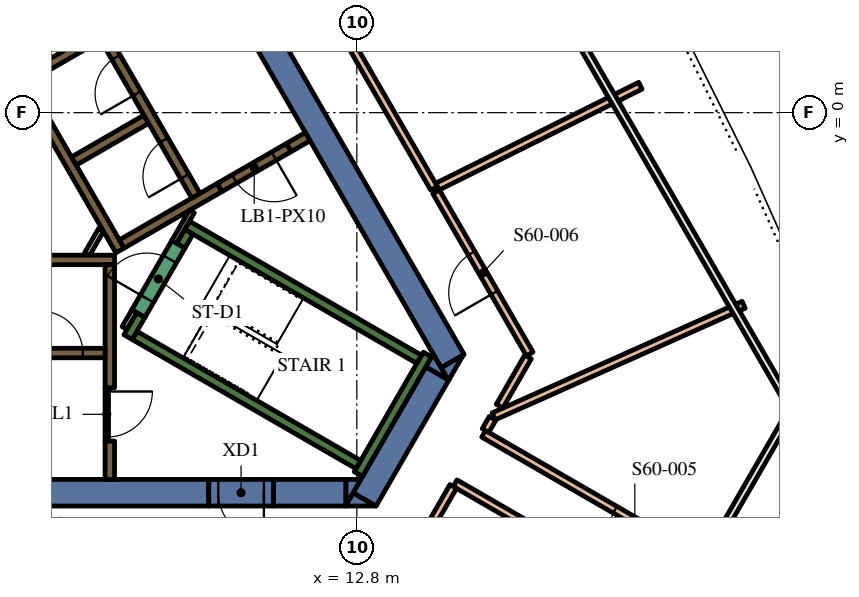
"""IFC4 building model, lengths in metres.
Left out: names, types, materials, properties, quantities, classifications, styles, units other than length and angle.
Written with IfcOpenShell. Run it as: python <this file> out.ifc"""

import sys

from ifc_helpers import new_model, si_unit, direction, frame, frame_2d, origin, place, context, subcontext, project, spatial, polyline, rectangle, outline, extrude, element, fill, save


model = new_model("IFC4")
c1 = context("Model", 3, precision=1e-05, world=origin(), true_north=direction((0.0, 1.0)))
c2 = subcontext(c1, "Body", "Model", "MODEL_VIEW")
j1 = project(units=[si_unit("LENGTHUNIT", "METRE"), si_unit("PLANEANGLEUNIT", "RADIAN")], contexts=[c1])
p1 = place(None, origin())
s1 = spatial("IfcSite", under=j1, at=p1, CompositionType="ELEMENT")
p2 = place(p1, origin())
s2 = spatial("IfcBuilding", under=s1, at=p2, CompositionType="ELEMENT")
p3 = place(p2, frame((0.0, 0.0, 256.2)))
s3 = spatial("IfcBuildingStorey", under=s2, at=p3, CompositionType="ELEMENT", Elevation=256.2)
p4 = place(p3, frame((9.085, 4.264, 0.0), z_axis=(0.0, 0.0, 1.0), x_axis=(0.499998082512, -0.866026510844, 0.0)))
e1 = element("IfcWall", 1, at=p4, inside=s3, PredefinedType="SOLIDWALL", context=c2, shape_type="SweptSolid", body=[
    extrude(rectangle(XDim=12.472, YDim=0.7, at=frame_2d((6.236, 0.0))), origin(), (0.0, 0.0, 1.0), 5.4),
])
p5 = place(p3, origin())
e2 = element("IfcWall", 2, at=p5, inside=s3, PredefinedType="SOLIDWALL", context=c2, shape_type="SweptSolid", body=[
    extrude(outline(polyline([(15.213, -7.05), (15.019, -6.714), (15.601, -6.378), (15.213, -7.05)])), origin(), (0.0, 0.0, 1.0), 5.4),
])
p6 = place(p3, frame((13.003, -10.179, 0.0), z_axis=(0.0, 0.0, 1.0), x_axis=(0.499972675833, 0.866041178825, 0.0)))
e3 = element("IfcWall", 3, at=p6, inside=s3, PredefinedType="SOLIDWALL", context=c2, shape_type="SweptSolid", body=[
    extrude(rectangle(XDim=3.829, YDim=0.7, at=frame_2d((1.915, 0.0))), origin(), (0.0, 0.0, 1.0), 5.4),
])
e4 = element("IfcWall", 4, at=p5, inside=s3, PredefinedType="SOLIDWALL", context=c2, shape_type="SweptSolid", body=[
    extrude(outline(polyline([(12.698, -10.005), (13.296, -10.35), (12.5, -10.35), (12.698, -10.005)])), origin(), (0.0, 0.0, 1.0), 5.4),
])
e5 = element("IfcWall", 5, at=p5, inside=s3, PredefinedType="SOLIDWALL", context=c2, shape_type="SweptSolid", body=[
    extrude(outline(polyline([(14.809, -6.35), (15.197, -7.022), (14.615, -6.686), (14.809, -6.35)])), origin(), (0.0, 0.0, 1.0), 5.4),
])
p7 = place(p3, frame((10.604, -10.0, 0.0), z_axis=(0.0, 0.0, 1.0), x_axis=(1.0, 0.0, 0.0)))
e6 = element("IfcWall", 6, at=p7, inside=s3, PredefinedType="SOLIDWALL", context=c2, shape_type="SweptSolid", body=[
    extrude(rectangle(XDim=1.909, YDim=0.7, at=frame_2d((0.955, 0.0))), origin(), (0.0, 0.0, 1.0), 5.4),
])
e7 = element("IfcWall", 7, at=p5, inside=s3, PredefinedType="SOLIDWALL", context=c2, shape_type="SweptSolid", body=[
    extrude(outline(polyline([(12.904, -9.65), (12.516, -10.322), (12.516, -9.65), (12.904, -9.65)])), origin(), (0.0, 0.0, 1.0), 5.4),
])
p8 = place(p3, frame((8.904, -10.0, 0.0), z_axis=(0.0, 0.0, 1.0), x_axis=(-1.0, 0.0, 0.0)))
e8 = element("IfcWall", 8, at=p8, inside=s3, PredefinedType="SOLIDWALL", context=c2, shape_type="SweptSolid", body=[
    extrude(rectangle(XDim=22.226, YDim=0.7, at=frame_2d((11.113, 0.0))), origin(), (0.0, 0.0, 1.0), 5.4),
])
p9 = place(p3, frame((12.84, -9.511, 0.0), z_axis=(0.0, 0.0, 1.0), x_axis=(0.500048121057, 0.865997619297, 0.0)))
e9 = element("IfcWall", 9, at=p9, inside=s3, PredefinedType="SOLIDWALL", context=c2, shape_type="SweptSolid", body=[
    extrude(rectangle(XDim=3.634, YDim=0.25, at=frame_2d((1.817, 0.0))), origin(), (0.0, 0.0, 1.0), 5.4),
])
p10 = place(p3, frame((12.84, -9.261, 0.0), z_axis=(0.0, 0.0, 1.0), x_axis=(-0.866013990052, 0.500019768644, 0.0)))
e10 = element("IfcWall", 10, at=p10, inside=s3, PredefinedType="SOLIDWALL", context=c2, shape_type="SweptSolid", body=[
    extrude(rectangle(XDim=6.8, YDim=0.25, at=frame_2d((3.4, 0.0))), origin(), (0.0, 0.0, 1.0), 5.4),
])
p11 = place(p3, frame((6.78, -5.906, 0.0), z_axis=(0.0, 0.0, 1.0), x_axis=(0.500223362819, 0.865896406789, 0.0)))
e11 = element("IfcWall", 11, at=p11, inside=s3, PredefinedType="SOLIDWALL", context=c2, shape_type="SweptSolid", body=[
    extrude(rectangle(XDim=0.675, YDim=0.25, at=frame_2d((0.337, 0.0))), origin(), (0.0, 0.0, 1.0), 5.4),
])
p12 = place(p3, frame((8.334, -2.964, 0.0), z_axis=(0.0, 0.0, 1.0), x_axis=(0.866016039709, -0.500016218704, 0.0)))
e12 = element("IfcWall", 12, at=p12, inside=s3, PredefinedType="SOLIDWALL", context=c2, shape_type="SweptSolid", body=[
    extrude(rectangle(XDim=7.05, YDim=0.25, at=frame_2d((3.525, 0.0))), origin(), (0.0, 0.0, 1.0), 5.4),
])
p13 = place(p3, frame((8.168, -3.503, 0.0), z_axis=(0.0, 0.0, 1.0), x_axis=(0.49972245349, 0.866185586049, 0.0)))
e13 = element("IfcWall", 13, at=p13, inside=s3, PredefinedType="SOLIDWALL", context=c2, shape_type="SweptSolid", body=[
    extrude(rectangle(XDim=0.425, YDim=0.25, at=frame_2d((0.212, 0.0))), origin(), (0.0, 0.0, 1.0), 5.4),
])
p14 = place(p3, frame((-5.545, -3.875, 0.0), z_axis=(0.0, 0.0, 1.0), x_axis=(1.0, 0.0, 0.0)))
e14 = element("IfcWall", 14, at=p14, inside=s3, PredefinedType="SOLIDWALL", context=c2, shape_type="SweptSolid", body=[
    extrude(rectangle(XDim=11.97, YDim=0.25, at=frame_2d((5.985, 0.0))), origin(), (0.0, 0.0, 1.0), 5.4),
])
p15 = place(p3, frame((6.3, -7.24, 0.0), z_axis=(0.0, 0.0, 1.0), x_axis=(0.0, 1.0, 0.0)))
e15 = element("IfcWall", 15, at=p15, inside=s3, PredefinedType="SOLIDWALL", context=c2, shape_type="SweptSolid", body=[
    extrude(rectangle(XDim=3.24, YDim=0.25, at=frame_2d((1.62, 0.0))), origin(), (0.0, 0.0, 1.0), 5.4),
])
p16 = place(p3, frame((6.3, -9.65, 0.0), z_axis=(0.0, 0.0, 1.0), x_axis=(0.0, 1.0, 0.0)))
e16 = element("IfcWall", 16, at=p16, inside=s3, PredefinedType="SOLIDWALL", context=c2, shape_type="SweptSolid", body=[
    extrude(rectangle(XDim=1.008, YDim=0.25, at=frame_2d((0.504, 0.0))), origin(), (0.0, 0.0, 1.0), 5.4),
])
p17 = place(p3, frame((11.507, -0.631, 0.0), z_axis=(0.0, 0.0, 1.0), x_axis=(-0.866093731455, -0.499881634324, 0.0)))
e17 = element("IfcWall", 17, at=p17, inside=s3, PredefinedType="SOLIDWALL", context=c2, shape_type="SweptSolid", body=[
    extrude(rectangle(XDim=0.575, YDim=0.25, at=frame_2d((0.288, 0.0))), origin(), (0.0, 0.0, 1.0), 5.4),
])
p18 = place(p3, frame((6.568, -3.627, 0.0), z_axis=(0.0, 0.0, 1.0), x_axis=(-0.499999455981, 0.866025717874, 0.0)))
e18 = element("IfcWall", 18, at=p18, inside=s3, PredefinedType="SOLIDWALL", context=c2, shape_type="SweptSolid", body=[
    extrude(rectangle(XDim=11.978, YDim=0.25, at=frame_2d((5.989, 0.0))), origin(), (0.0, 0.0, 1.0), 5.4),
])
for number, where, z_axis, x_axis in (
    (19, (4.094, 0.909, 0.0), (0.0, 0.0, 1.0), (0.866, 0.5, 0.0)),
    (20, (5.354, -1.274, 0.0), (0.0, 0.0, 1.0), (0.866, 0.5, 0.0)),
):
    element("IfcWall", number, at=place(p3, frame(where, z_axis=z_axis, x_axis=x_axis)), inside=s3, PredefinedType="SOLIDWALL", context=c2, shape_type="SweptSolid", body=[
        extrude(rectangle(XDim=2.2, YDim=0.25, at=frame_2d((1.1, 0.0))), origin(), (0.0, 0.0, 1.0), 5.4),
    ])
p19 = place(p3, frame((6.614, -3.456, 0.0), z_axis=(0.0, 0.0, 1.0), x_axis=(0.866032512851, 0.499987686533, 0.0)))
e21 = element("IfcWall", 21, at=p19, inside=s3, PredefinedType="SOLIDWALL", context=c2, shape_type="SweptSolid", body=[
    extrude(rectangle(XDim=2.975, YDim=0.25, at=frame_2d((1.487, 0.0))), origin(), (0.0, 0.0, 1.0), 5.4),
])
p20 = place(p3, frame((6.945, -5.222, 0.0), z_axis=(0.0, 0.0, 1.0), x_axis=(-0.499818422106, -0.866130212453, 0.0)))
e22 = element("IfcWall", 22, at=p20, inside=s3, PredefinedType="PARTITIONING", context=c2, shape_type="SweptSolid", body=[
    extrude(rectangle(XDim=0.514, YDim=0.15, at=frame_2d((0.257, 0.0))), origin(), (0.0, 0.0, 1.0), 4.3),
])
p21 = place(p3, frame((8.459, -2.599, 0.0), z_axis=(0.0, 0.0, 1.0), x_axis=(-0.500041054325, -0.866001699761, 0.0)))
e23 = element("IfcWall", 23, at=p21, inside=s3, PredefinedType="PARTITIONING", context=c2, shape_type="SweptSolid", body=[
    extrude(rectangle(XDim=0.929, YDim=0.15, at=frame_2d((0.464, 0.0))), origin(), (0.0, 0.0, 1.0), 5.4),
])
p22 = place(p3, frame((5.705, -3.718, 0.0), z_axis=(0.0, 0.0, 1.0), x_axis=(0.499962090823, 0.866047289552, 0.0)))
e24 = element("IfcWall", 24, at=p22, inside=s3, PredefinedType="PARTITIONING", context=c2, shape_type="SweptSolid", body=[
    extrude(rectangle(XDim=0.735, YDim=0.15, at=frame_2d((0.367, 0.0))), origin(), (0.0, 0.0, 1.0), 4.3),
])
p23 = place(p3, frame((-6.175, -6.325, 0.0), z_axis=(0.0, 0.0, 1.0), x_axis=(1.0, 0.0, 0.0)))
e25 = element("IfcWall", 25, at=p23, inside=s3, PredefinedType="SOLIDWALL", context=c2, shape_type="SweptSolid", body=[
    extrude(rectangle(XDim=12.35, YDim=0.25, at=frame_2d((6.175, 0.0))), origin(), (0.0, 0.0, 1.0), 5.4),
])
p24 = place(p23, frame((0.585, 0.0, 0.0)))
e26 = element("IfcOpeningElement", 26, at=p24, cuts=e25, PredefinedType="OPENING", context=c2, shape_type="SweptSolid", body=[
    extrude(rectangle(XDim=1.1, YDim=2.1, at=frame_2d((0.55, 1.05))), frame((0.0, 0.135, 0.0), z_axis=(0.0, -1.0, 0.0), x_axis=(1.0, 0.0, 0.0)), (0.0, 0.0, 1.0), 0.27),
])
p25 = place(p23, frame((3.105, 0.0, 0.0)))
e27 = element("IfcOpeningElement", 27, at=p25, cuts=e25, PredefinedType="OPENING", context=c2, shape_type="SweptSolid", body=[
    extrude(rectangle(XDim=1.1, YDim=2.1, at=frame_2d((0.55, 1.05))), frame((0.0, 0.135, 0.0), z_axis=(0.0, -1.0, 0.0), x_axis=(1.0, 0.0, 0.0)), (0.0, 0.0, 1.0), 0.27),
])
p26 = place(p23, frame((5.625, 0.0, 0.0)))
e28 = element("IfcOpeningElement", 28, at=p26, cuts=e25, PredefinedType="OPENING", context=c2, shape_type="SweptSolid", body=[
    extrude(rectangle(XDim=1.1, YDim=2.1, at=frame_2d((0.55, 1.05))), frame((0.0, 0.135, 0.0), z_axis=(0.0, -1.0, 0.0), x_axis=(1.0, 0.0, 0.0)), (0.0, 0.0, 1.0), 0.27),
])
p27 = place(p23, frame((8.145, 0.0, 0.0)))
e29 = element("IfcOpeningElement", 29, at=p27, cuts=e25, PredefinedType="OPENING", context=c2, shape_type="SweptSolid", body=[
    extrude(rectangle(XDim=1.1, YDim=2.1, at=frame_2d((0.55, 1.05))), frame((0.0, 0.135, 0.0), z_axis=(0.0, -1.0, 0.0), x_axis=(1.0, 0.0, 0.0)), (0.0, 0.0, 1.0), 0.27),
])
p28 = place(p23, frame((10.665, 0.0, 0.0)))
e30 = element("IfcOpeningElement", 30, at=p28, cuts=e25, PredefinedType="OPENING", context=c2, shape_type="SweptSolid", body=[
    extrude(rectangle(XDim=1.1, YDim=2.1, at=frame_2d((0.55, 1.05))), frame((0.0, 0.135, 0.0), z_axis=(0.0, -1.0, 0.0), x_axis=(1.0, 0.0, 0.0)), (0.0, 0.0, 1.0), 0.27),
])
p29 = place(p3, frame((8.565, -2.185, 0.0), z_axis=(0.0, 0.0, 1.0), x_axis=(-0.499997954832, 0.866026584559, 0.0)))
e31 = element("IfcWall", 31, at=p29, inside=s3, PredefinedType="SOLIDWALL", context=c2, shape_type="SweptSolid", body=[
    extrude(rectangle(XDim=12.35, YDim=0.25, at=frame_2d((6.175, 0.0))), origin(), (0.0, 0.0, 1.0), 5.4),
])
p30 = place(p29, frame((0.585, 0.0, 0.0)))
e32 = element("IfcOpeningElement", 32, at=p30, cuts=e31, PredefinedType="OPENING", context=c2, shape_type="SweptSolid", body=[
    extrude(rectangle(XDim=1.1, YDim=2.1, at=frame_2d((0.55, 1.05))), frame((0.0, 0.135, 0.0), z_axis=(0.0, -1.0, 0.0), x_axis=(1.0, 0.0, 0.0)), (0.0, 0.0, 1.0), 0.27),
])
p31 = place(p29, frame((3.105, 0.0, 0.0)))
e33 = element("IfcOpeningElement", 33, at=p31, cuts=e31, PredefinedType="OPENING", context=c2, shape_type="SweptSolid", body=[
    extrude(rectangle(XDim=1.1, YDim=2.1, at=frame_2d((0.55, 1.05))), frame((0.0, 0.135, 0.0), z_axis=(0.0, -1.0, 0.0), x_axis=(1.0, 0.0, 0.0)), (0.0, 0.0, 1.0), 0.27),
])
p32 = place(p29, frame((5.625, 0.0, 0.0)))
e34 = element("IfcOpeningElement", 34, at=p32, cuts=e31, PredefinedType="OPENING", context=c2, shape_type="SweptSolid", body=[
    extrude(rectangle(XDim=1.1, YDim=2.1, at=frame_2d((0.55, 1.05))), frame((0.0, 0.135, 0.0), z_axis=(0.0, -1.0, 0.0), x_axis=(1.0, 0.0, 0.0)), (0.0, 0.0, 1.0), 0.27),
])
p33 = place(p29, frame((8.145, 0.0, 0.0)))
e35 = element("IfcOpeningElement", 35, at=p33, cuts=e31, PredefinedType="OPENING", context=c2, shape_type="SweptSolid", body=[
    extrude(rectangle(XDim=1.1, YDim=2.1, at=frame_2d((0.55, 1.05))), frame((0.0, 0.135, 0.0), z_axis=(0.0, -1.0, 0.0), x_axis=(1.0, 0.0, 0.0)), (0.0, 0.0, 1.0), 0.27),
])
p34 = place(p29, frame((10.665, 0.0, 0.0)))
e36 = element("IfcOpeningElement", 36, at=p34, cuts=e31, PredefinedType="OPENING", context=c2, shape_type="SweptSolid", body=[
    extrude(rectangle(XDim=1.1, YDim=2.1, at=frame_2d((0.55, 1.05))), frame((0.0, 0.135, 0.0), z_axis=(0.0, -1.0, 0.0), x_axis=(1.0, 0.0, 0.0)), (0.0, 0.0, 1.0), 0.27),
])
p35 = place(p3, frame((7.053, -5.284, 0.0), z_axis=(0.0, 0.0, 1.0), x_axis=(0.500078061341, 0.865980330357, 0.0)))
e37 = element("IfcWall", 37, at=p35, inside=s3, PredefinedType="SOLIDWALL", context=c2, shape_type="SweptSolid", body=[
    extrude(rectangle(XDim=2.1, YDim=0.4, at=frame_2d((1.05, 0.0))), origin(), (0.0, 0.0, 1.0), 5.4),
])
p36 = place(p35, frame((0.45, 0.0, 0.0)))
e38 = element("IfcOpeningElement", 38, at=p36, cuts=e37, PredefinedType="OPENING", context=c2, shape_type="SweptSolid", body=[
    extrude(rectangle(XDim=1.2, YDim=2.1, at=frame_2d((0.6, 1.05))), frame((0.0, 0.21, 0.0), z_axis=(0.0, -1.0, 0.0), x_axis=(1.0, 0.0, 0.0)), (0.0, 0.0, 1.0), 0.42),
])
p37 = place(p3, frame((6.22, -7.237, 0.0), z_axis=(0.0, 0.0, 1.0), x_axis=(0.0, -1.0, 0.0)))
e39 = element("IfcWall", 39, at=p37, inside=s3, PredefinedType="PARTITIONING", context=c2, shape_type="SweptSolid", body=[
    extrude(rectangle(XDim=1.4, YDim=0.09, at=frame_2d((0.7, 0.0))), origin(), (0.0, 0.0, 1.0), 4.3),
])
p38 = place(p37, frame((0.1, 0.0, 0.0)))
e40 = element("IfcOpeningElement", 40, at=p38, cuts=e39, PredefinedType="OPENING", context=c2, shape_type="SweptSolid", body=[
    extrude(rectangle(XDim=1.2, YDim=2.1, at=frame_2d((0.6, 1.05))), frame((0.0, 0.055, 0.0), z_axis=(0.0, -1.0, 0.0), x_axis=(1.0, 0.0, 0.0)), (0.0, 0.0, 1.0), 0.11),
])
p39 = place(p3, frame((11.009, -0.919, 0.0), z_axis=(0.0, 0.0, 1.0), x_axis=(-0.866059744384, -0.49994051562, 0.0)))
e41 = element("IfcWall", 41, at=p39, inside=s3, PredefinedType="SOLIDWALL", context=c2, shape_type="SweptSolid", body=[
    extrude(rectangle(XDim=2.1, YDim=0.25, at=frame_2d((1.05, 0.0))), origin(), (0.0, 0.0, 1.0), 5.4),
])
p40 = place(p39, frame((0.45, 0.0, 0.0)))
e42 = element("IfcOpeningElement", 42, at=p40, cuts=e41, PredefinedType="OPENING", context=c2, shape_type="SweptSolid", body=[
    extrude(rectangle(XDim=1.2, YDim=2.1, at=frame_2d((0.6, 1.05))), frame((0.0, 0.135, 0.0), z_axis=(0.0, -1.0, 0.0), x_axis=(1.0, 0.0, 0.0)), (0.0, 0.0, 1.0), 0.27),
])
p41 = place(p3, frame((10.604, -10.0, 0.0), z_axis=(0.0, 0.0, 1.0), x_axis=(-1.0, 0.0, 0.0)))
e43 = element("IfcWall", 43, at=p41, inside=s3, PredefinedType="SOLIDWALL", context=c2, shape_type="SweptSolid", body=[
    extrude(rectangle(XDim=1.7, YDim=0.7, at=frame_2d((0.85, 0.0))), origin(), (0.0, 0.0, 1.0), 5.4),
])
p42 = place(p41, frame((0.25, 0.0, 0.0)))
e44 = element("IfcOpeningElement", 44, at=p42, cuts=e43, PredefinedType="OPENING", context=c2, shape_type="SweptSolid", body=[
    extrude(rectangle(XDim=1.2, YDim=2.1, at=frame_2d((0.6, 1.05))), frame((0.0, 0.36, 0.0), z_axis=(0.0, -1.0, 0.0), x_axis=(1.0, 0.0, 0.0)), (0.0, 0.0, 1.0), 0.72),
])
p43 = place(p3, frame((14.833, -1.99, 0.0), z_axis=(0.0, 0.0, 1.0), x_axis=(-0.500002996416, 0.866023673796, 0.0)))
e45 = element("IfcWall", 45, at=p43, inside=s3, PredefinedType="PARTITIONING", context=c2, shape_type="SweptSolid", body=[
    extrude(rectangle(XDim=18.28, YDim=0.2, at=frame_2d((9.14, 0.0))), origin(), (0.0, 0.0, 1.0), 4.3),
])
p44 = place(p43, frame((8.54, 0.0, 0.0)))
e46 = element("IfcOpeningElement", 46, at=p44, cuts=e45, PredefinedType="OPENING", context=c2, shape_type="SweptSolid", body=[
    extrude(rectangle(XDim=1.2, YDim=2.1, at=frame_2d((0.6, 1.05))), frame((0.0, 0.11, 0.0), z_axis=(0.0, -1.0, 0.0), x_axis=(1.0, 0.0, 0.0)), (0.0, 0.0, 1.0), 0.22),
])
p45 = place(p3, frame((23.343, -14.343, 0.0), z_axis=(0.0, 0.0, 1.0), x_axis=(-0.866028486751, 0.499994660107, 0.0)))
e47 = element("IfcWall", 47, at=p45, inside=s3, PredefinedType="PARTITIONING", context=c2, shape_type="SweptSolid", body=[
    extrude(rectangle(XDim=9.187, YDim=0.2, at=frame_2d((4.594, 0.0))), origin(), (0.0, 0.0, 1.0), 4.3),
])
p46 = place(p3, frame((24.093, -13.044, 0.0), z_axis=(0.0, 0.0, 1.0), x_axis=(-0.866028486751, 0.499994660107, 0.0)))
e48 = element("IfcWall", 48, at=p46, inside=s3, PredefinedType="PARTITIONING", context=c2, shape_type="SweptSolid", body=[
    extrude(rectangle(XDim=9.187, YDim=0.2, at=frame_2d((4.594, 0.0))), origin(), (0.0, 0.0, 1.0), 4.3),
])
p47 = place(p46, frame((3.993, 0.0, 0.0)))
e49 = element("IfcOpeningElement", 49, at=p47, cuts=e48, PredefinedType="OPENING", context=c2, shape_type="SweptSolid", body=[
    extrude(rectangle(XDim=1.2, YDim=2.1, at=frame_2d((0.6, 1.05))), frame((0.0, 0.11, 0.0), z_axis=(0.0, -1.0, 0.0), x_axis=(1.0, 0.0, 0.0)), (0.0, 0.0, 1.0), 0.22),
])
p48 = place(p3, frame((16.402, -7.991, 0.0), z_axis=(0.0, 0.0, 1.0), x_axis=(0.913168751413, 0.407581686834, 0.0)))
e50 = element("IfcWall", 50, at=p48, inside=s3, PredefinedType="PARTITIONING", context=c2, shape_type="SweptSolid", body=[
    extrude(rectangle(XDim=7.202, YDim=0.2, at=frame_2d((3.601, 0.0))), origin(), (0.0, 0.0, 1.0), 4.3),
])
p49 = place(p3, frame((14.922, -1.946, 0.0), z_axis=(0.0, 0.0, 1.0), x_axis=(0.895456612303, 0.445148801507, 0.0)))
e51 = element("IfcWall", 51, at=p49, inside=s3, PredefinedType="PARTITIONING", context=c2, shape_type="SweptSolid", body=[
    extrude(rectangle(XDim=5.963, YDim=0.2, at=frame_2d((2.981, 0.0))), origin(), (0.0, 0.0, 1.0), 4.3),
])
p50 = place(p3, frame((17.349, -6.35, 0.0), z_axis=(0.0, 0.0, 1.0), x_axis=(-0.499994255055, 0.866028720605, 0.0)))
e52 = element("IfcWall", 52, at=p50, inside=s3, PredefinedType="PARTITIONING", context=c2, shape_type="SweptSolid", body=[
    extrude(rectangle(XDim=4.924, YDim=0.2, at=frame_2d((2.462, 0.0))), origin(), (0.0, 0.0, 1.0), 4.3),
])
p51 = place(p50, frame((1.862, 0.0, 0.0)))
e53 = element("IfcOpeningElement", 53, at=p51, cuts=e52, PredefinedType="OPENING", context=c2, shape_type="SweptSolid", body=[
    extrude(rectangle(XDim=1.2, YDim=2.1, at=frame_2d((0.6, 1.05))), frame((0.0, 0.11, 0.0), z_axis=(0.0, -1.0, 0.0), x_axis=(1.0, 0.0, 0.0)), (0.0, 0.0, 1.0), 0.22),
])
p52 = place(p3, frame((15.337, -9.836, 0.0), z_axis=(0.0, 0.0, 1.0), x_axis=(-0.499968249168, -0.86604373436, 0.0)))
e54 = element("IfcWall", 54, at=p52, inside=s3, PredefinedType="PARTITIONING", context=c2, shape_type="SweptSolid", body=[
    extrude(rectangle(XDim=2.236, YDim=0.2, at=frame_2d((1.118, 0.0))), origin(), (0.0, 0.0, 1.0), 4.3),
])
p53 = place(p3, frame((17.304, -6.428, 0.0), z_axis=(0.0, 0.0, 1.0), x_axis=(-0.500108879088, -0.865962533287, 0.0)))
e55 = element("IfcWall", 55, at=p53, inside=s3, PredefinedType="PARTITIONING", context=c2, shape_type="SweptSolid", body=[
    extrude(rectangle(XDim=1.495, YDim=0.2, at=frame_2d((0.748, 0.0))), origin(), (0.0, 0.0, 1.0), 4.3),
])
p54 = place(p3, frame((16.372, -8.042, 0.0), z_axis=(0.0, 0.0, 1.0), x_axis=(-0.499817339582, -0.866130837145, 0.0)))
e56 = element("IfcWall", 56, at=p54, inside=s3, PredefinedType="PARTITIONING", context=c2, shape_type="SweptSolid", body=[
    extrude(rectangle(XDim=0.371, YDim=0.2, at=frame_2d((0.186, 0.0))), origin(), (0.0, 0.0, 1.0), 4.3),
])
p55 = place(p28, origin())
e57 = element("IfcDoor", 57, at=p55, inside=s3, OperationType="DOUBLE_DOOR_SLIDING", PredefinedType="DOOR", context=c2, shape_type="SweptSolid", body=[
    extrude(rectangle(XDim=1.1, YDim=2.1, at=frame_2d((0.55, 1.05))), frame((0.0, 0.025, 0.0), z_axis=(0.0, -1.0, 0.0), x_axis=(1.0, 0.0, 0.0)), (0.0, 0.0, 1.0), 0.05),
])
fill(e30, e57)
p56 = place(p30, origin())
e58 = element("IfcDoor", 58, at=p56, inside=s3, OperationType="DOUBLE_DOOR_SLIDING", PredefinedType="DOOR", context=c2, shape_type="SweptSolid", body=[
    extrude(rectangle(XDim=1.1, YDim=2.1, at=frame_2d((0.55, 1.05))), frame((0.0, 0.025, 0.0), z_axis=(0.0, -1.0, 0.0), x_axis=(1.0, 0.0, 0.0)), (0.0, 0.0, 1.0), 0.05),
])
fill(e32, e58)
p57 = place(p31, origin())
e59 = element("IfcDoor", 59, at=p57, inside=s3, OperationType="DOUBLE_DOOR_SLIDING", PredefinedType="DOOR", context=c2, shape_type="SweptSolid", body=[
    extrude(rectangle(XDim=1.1, YDim=2.1, at=frame_2d((0.55, 1.05))), frame((0.0, 0.025, 0.0), z_axis=(0.0, -1.0, 0.0), x_axis=(1.0, 0.0, 0.0)), (0.0, 0.0, 1.0), 0.05),
])
fill(e33, e59)
p58 = place(p36, origin())
e60 = element("IfcDoor", 60, at=p58, inside=s3, OperationType="SINGLE_SWING_LEFT", PredefinedType="DOOR", context=c2, shape_type="SweptSolid", body=[
    extrude(rectangle(XDim=1.2, YDim=2.1, at=frame_2d((0.6, 1.05))), frame((0.0, 0.025, 0.0), z_axis=(0.0, -1.0, 0.0), x_axis=(1.0, 0.0, 0.0)), (0.0, 0.0, 1.0), 0.05),
])
fill(e38, e60)
p59 = place(p38, origin())
e61 = element("IfcDoor", 61, at=p59, inside=s3, OperationType="SINGLE_SWING_LEFT", PredefinedType="DOOR", context=c2, shape_type="SweptSolid", body=[
    extrude(rectangle(XDim=1.2, YDim=2.1, at=frame_2d((0.6, 1.05))), frame((0.0, 0.025, 0.0), z_axis=(0.0, -1.0, 0.0), x_axis=(1.0, 0.0, 0.0)), (0.0, 0.0, 1.0), 0.05),
])
fill(e40, e61)
p60 = place(p40, origin())
e62 = element("IfcDoor", 62, at=p60, inside=s3, OperationType="SINGLE_SWING_LEFT", PredefinedType="DOOR", context=c2, shape_type="SweptSolid", body=[
    extrude(rectangle(XDim=1.2, YDim=2.1, at=frame_2d((0.6, 1.05))), frame((0.0, 0.025, 0.0), z_axis=(0.0, -1.0, 0.0), x_axis=(1.0, 0.0, 0.0)), (0.0, 0.0, 1.0), 0.05),
])
fill(e42, e62)
p61 = place(p42, origin())
e63 = element("IfcDoor", 63, at=p61, inside=s3, OperationType="SINGLE_SWING_LEFT", PredefinedType="DOOR", context=c2, shape_type="SweptSolid", body=[
    extrude(rectangle(XDim=1.2, YDim=2.1, at=frame_2d((0.6, 1.05))), frame((0.0, 0.025, 0.0), z_axis=(0.0, -1.0, 0.0), x_axis=(1.0, 0.0, 0.0)), (0.0, 0.0, 1.0), 0.05),
])
fill(e44, e63)
p62 = place(p47, origin())
e64 = element("IfcDoor", 64, at=p62, inside=s3, OperationType="SINGLE_SWING_RIGHT", PredefinedType="DOOR", context=c2, shape_type="SweptSolid", body=[
    extrude(rectangle(XDim=1.2, YDim=2.1, at=frame_2d((0.6, 1.05))), frame((0.0, 0.025, 0.0), z_axis=(0.0, -1.0, 0.0), x_axis=(1.0, 0.0, 0.0)), (0.0, 0.0, 1.0), 0.05),
])
fill(e49, e64)
p63 = place(p51, origin())
e65 = element("IfcDoor", 65, at=p63, inside=s3, OperationType="SINGLE_SWING_RIGHT", PredefinedType="DOOR", context=c2, shape_type="SweptSolid", body=[
    extrude(rectangle(XDim=1.2, YDim=2.1, at=frame_2d((0.6, 1.05))), frame((0.0, 0.025, 0.0), z_axis=(0.0, -1.0, 0.0), x_axis=(1.0, 0.0, 0.0)), (0.0, 0.0, 1.0), 0.05),
])
fill(e53, e65)
save(model, sys.argv[1])
